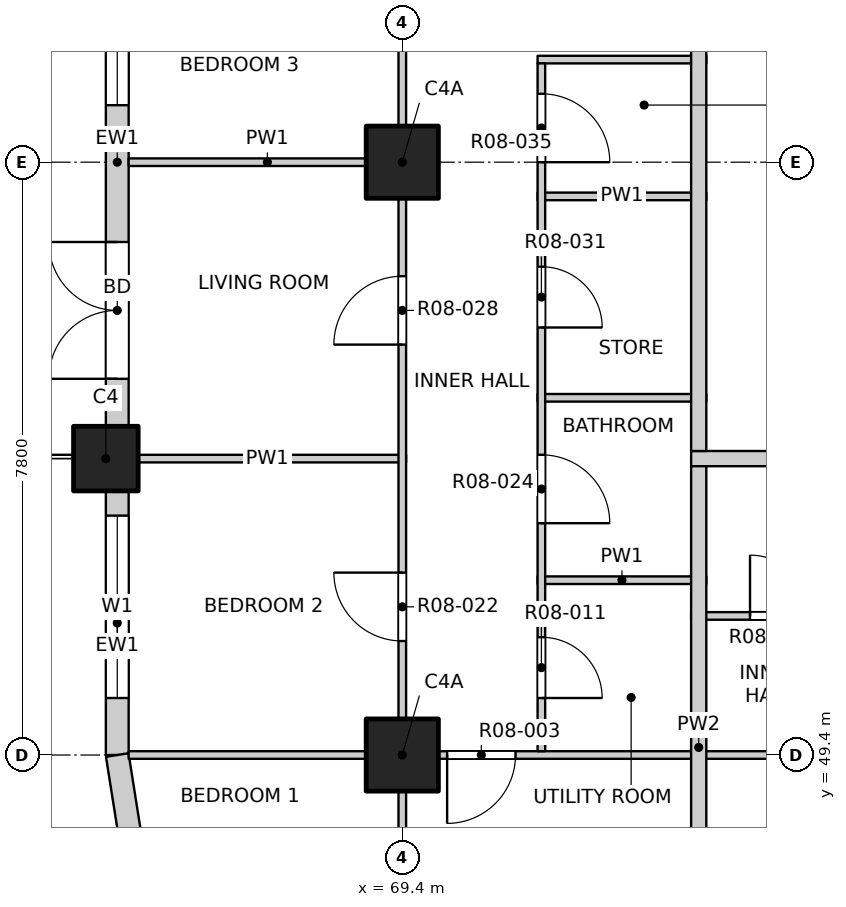
"""IFC4 building model, lengths in metres.
Left out: names, types, materials, properties, quantities, classifications, styles, units other than length and angle.
Written with IfcOpenShell. Run it as: python <this file> out.ifc"""

import sys

from ifc_helpers import new_model, si_unit, direction, frame, frame_2d, origin, origin_2d, place, context, subcontext, project, spatial, rectangle, extrude, element, fill, save


model = new_model("IFC4")
c1 = context("Model", 3, precision=1e-05, world=origin(), true_north=direction((0.0, 1.0)))
c2 = subcontext(c1, "Body", "Model", "MODEL_VIEW")
j1 = project(units=[si_unit("LENGTHUNIT", "METRE"), si_unit("PLANEANGLEUNIT", "RADIAN")], contexts=[c1])
p1 = place(None, origin())
s1 = spatial("IfcSite", under=j1, at=p1, CompositionType="ELEMENT")
p2 = place(p1, origin())
s2 = spatial("IfcBuilding", under=s1, at=p2, CompositionType="ELEMENT")
p3 = place(p2, frame((0.0, 0.0, 99.9)))
s3 = spatial("IfcBuildingStorey", under=s2, at=p3, CompositionType="ELEMENT", Elevation=99.9)
p4 = place(p3, frame((65.5, 53.3, -0.3), z_axis=(0.0, 0.0, 1.0), x_axis=(1.0, 0.0, 0.0)))
e1 = element("IfcColumn", 1, at=p4, inside=s3, PredefinedType="COLUMN", context=c2, shape_type="SweptSolid", body=[
    extrude(rectangle(XDim=0.85, YDim=0.85, at=origin_2d()), origin(), (0.0, 0.0, 1.0), 3.45),
])
for number, where, z_axis, x_axis in (
    (2, (69.4, 49.4, -0.3), (0.0, 0.0, 1.0), (1.0, 0.0, 0.0)),
    (3, (69.4, 57.2, -0.3), (0.0, 0.0, 1.0), (1.0, 0.0, 0.0)),
):
    element("IfcColumn", number, at=place(p3, frame(where, z_axis=z_axis, x_axis=x_axis)), inside=s3, PredefinedType="COLUMN", context=c2, shape_type="SweptSolid", body=[
        extrude(rectangle(XDim=0.95, YDim=0.95, at=origin_2d()), origin(), (0.0, 0.0, 1.0), 3.45),
    ])
p5 = place(p3, frame((65.65, 49.4, 0.0), z_axis=(0.0, 0.0, 1.0), x_axis=(0.0, 1.0, 0.0)))
e4 = element("IfcWall", 4, at=p5, inside=s3, PredefinedType="SOLIDWALL", context=c2, shape_type="SweptSolid", body=[
    extrude(rectangle(XDim=3.475, YDim=0.3, at=frame_2d((1.738, 0.0))), origin(), (0.0, 0.0, 1.0), 2.7),
])
p6 = place(p5, frame((0.75, 0.0, 0.9)))
e5 = element("IfcOpeningElement", 5, at=p6, cuts=e4, PredefinedType="OPENING", context=c2, shape_type="SweptSolid", body=[
    extrude(rectangle(XDim=2.4, YDim=1.8, at=frame_2d((1.2, 0.9))), frame((0.0, 0.16, 0.0), z_axis=(0.0, -1.0, 0.0), x_axis=(1.0, 0.0, 0.0)), (0.0, 0.0, 1.0), 0.32),
])
p7 = place(p3, frame((65.65, 53.725, 0.0), z_axis=(0.0, 0.0, 1.0), x_axis=(0.0, 1.0, 0.0)))
e6 = element("IfcWall", 6, at=p7, inside=s3, PredefinedType="SOLIDWALL", context=c2, shape_type="SweptSolid", body=[
    extrude(rectangle(XDim=6.95, YDim=0.3, at=frame_2d((3.475, 0.0))), origin(), (0.0, 0.0, 1.0), 2.7),
])
p8 = place(p7, frame((0.625, 0.0, 0.0)))
e7 = element("IfcOpeningElement", 7, at=p8, cuts=e6, PredefinedType="OPENING", context=c2, shape_type="SweptSolid", body=[
    extrude(rectangle(XDim=1.8, YDim=2.4, at=frame_2d((0.9, 1.2))), frame((0.0, 0.16, 0.0), z_axis=(0.0, -1.0, 0.0), x_axis=(1.0, 0.0, 0.0)), (0.0, 0.0, 1.0), 0.32),
])
p9 = place(p7, frame((4.225, 0.0, 0.9)))
e8 = element("IfcOpeningElement", 8, at=p9, cuts=e6, PredefinedType="OPENING", context=c2, shape_type="SweptSolid", body=[
    extrude(rectangle(XDim=2.4, YDim=1.8, at=frame_2d((1.2, 0.9))), frame((0.0, 0.16, 0.0), z_axis=(0.0, -1.0, 0.0), x_axis=(1.0, 0.0, 0.0)), (0.0, 0.0, 1.0), 0.32),
])
p10 = place(p3, frame((65.65, 49.4, 0.0), z_axis=(0.0, 0.0, 1.0), x_axis=(0.156496880861, -0.987678452879, 0.0)))
e9 = element("IfcWall", 9, at=p10, inside=s3, PredefinedType="SOLIDWALL", context=c2, shape_type="SweptSolid", body=[
    extrude(rectangle(XDim=1.173, YDim=0.3, at=frame_2d((0.586, 0.0))), origin(), (0.0, 0.0, 1.0), 2.7),
])
p11 = place(p3, frame((65.8, 49.4, 0.0), z_axis=(0.0, 0.0, 1.0), x_axis=(1.0, 0.0, 0.0)))
e10 = element("IfcWall", 10, at=p11, inside=s3, PredefinedType="PARTITIONING", context=c2, shape_type="SweptSolid", body=[
    extrude(rectangle(XDim=38.4, YDim=0.1, at=frame_2d((19.2, 0.0))), origin(), (0.0, 0.0, 1.0), 3.15),
])
p12 = place(p11, frame((4.19, 0.0, 0.0)))
e11 = element("IfcOpeningElement", 11, at=p12, cuts=e10, PredefinedType="OPENING", context=c2, shape_type="SweptSolid", body=[
    extrude(rectangle(XDim=0.9, YDim=2.1, at=frame_2d((0.45, 1.05))), frame((0.0, 0.06, 0.0), z_axis=(0.0, -1.0, 0.0), x_axis=(1.0, 0.0, 0.0)), (0.0, 0.0, 1.0), 0.12),
])
p13 = place(p11, frame((9.0, 0.0, 0.0)))
e12 = element("IfcOpeningElement", 12, at=p13, cuts=e10, PredefinedType="OPENING", context=c2, shape_type="SweptSolid", body=[
    extrude(rectangle(XDim=0.9, YDim=2.1, at=frame_2d((0.45, 1.05))), frame((0.0, 0.06, 0.0), z_axis=(0.0, -1.0, 0.0), x_axis=(1.0, 0.0, 0.0)), (0.0, 0.0, 1.0), 0.12),
])
p14 = place(p11, frame((12.9, 0.0, 0.0)))
e13 = element("IfcOpeningElement", 13, at=p14, cuts=e10, PredefinedType="OPENING", context=c2, shape_type="SweptSolid", body=[
    extrude(rectangle(XDim=0.9, YDim=2.1, at=frame_2d((0.45, 1.05))), frame((0.0, 0.06, 0.0), z_axis=(0.0, -1.0, 0.0), x_axis=(1.0, 0.0, 0.0)), (0.0, 0.0, 1.0), 0.12),
])
p15 = place(p11, frame((16.8, 0.0, 0.0)))
e14 = element("IfcOpeningElement", 14, at=p15, cuts=e10, PredefinedType="OPENING", context=c2, shape_type="SweptSolid", body=[
    extrude(rectangle(XDim=0.9, YDim=2.1, at=frame_2d((0.45, 1.05))), frame((0.0, 0.06, 0.0), z_axis=(0.0, -1.0, 0.0), x_axis=(1.0, 0.0, 0.0)), (0.0, 0.0, 1.0), 0.12),
])
p16 = place(p11, frame((20.7, 0.0, 0.0)))
e15 = element("IfcOpeningElement", 15, at=p16, cuts=e10, PredefinedType="OPENING", context=c2, shape_type="SweptSolid", body=[
    extrude(rectangle(XDim=0.9, YDim=2.1, at=frame_2d((0.45, 1.05))), frame((0.0, 0.06, 0.0), z_axis=(0.0, -1.0, 0.0), x_axis=(1.0, 0.0, 0.0)), (0.0, 0.0, 1.0), 0.12),
])
p17 = place(p11, frame((24.6, 0.0, 0.0)))
e16 = element("IfcOpeningElement", 16, at=p17, cuts=e10, PredefinedType="OPENING", context=c2, shape_type="SweptSolid", body=[
    extrude(rectangle(XDim=0.9, YDim=2.1, at=frame_2d((0.45, 1.05))), frame((0.0, 0.06, 0.0), z_axis=(0.0, -1.0, 0.0), x_axis=(1.0, 0.0, 0.0)), (0.0, 0.0, 1.0), 0.12),
])
p18 = place(p11, frame((28.5, 0.0, 0.0)))
e17 = element("IfcOpeningElement", 17, at=p18, cuts=e10, PredefinedType="OPENING", context=c2, shape_type="SweptSolid", body=[
    extrude(rectangle(XDim=0.9, YDim=2.1, at=frame_2d((0.45, 1.05))), frame((0.0, 0.06, 0.0), z_axis=(0.0, -1.0, 0.0), x_axis=(1.0, 0.0, 0.0)), (0.0, 0.0, 1.0), 0.12),
])
p19 = place(p11, frame((33.31, 0.0, 0.0)))
e18 = element("IfcOpeningElement", 18, at=p19, cuts=e10, PredefinedType="OPENING", context=c2, shape_type="SweptSolid", body=[
    extrude(rectangle(XDim=0.9, YDim=2.1, at=frame_2d((0.45, 1.05))), frame((0.0, 0.06, 0.0), z_axis=(0.0, -1.0, 0.0), x_axis=(1.0, 0.0, 0.0)), (0.0, 0.0, 1.0), 0.12),
])
p20 = place(p3, frame((73.2, 51.23, 0.0), z_axis=(0.0, 0.0, 1.0), x_axis=(1.0, 0.0, 0.0)))
e19 = element("IfcWall", 19, at=p20, inside=s3, PredefinedType="PARTITIONING", context=c2, shape_type="SweptSolid", body=[
    extrude(rectangle(XDim=4.75, YDim=0.1, at=frame_2d((2.375, 0.0))), origin(), (0.0, 0.0, 1.0), 3.15),
])
p21 = place(p20, frame((0.775, 0.0, 0.0)))
e20 = element("IfcOpeningElement", 20, at=p21, cuts=e19, PredefinedType="OPENING", context=c2, shape_type="SweptSolid", body=[
    extrude(rectangle(XDim=0.8, YDim=2.1, at=frame_2d((0.4, 1.05))), frame((0.0, 0.06, 0.0), z_axis=(0.0, -1.0, 0.0), x_axis=(1.0, 0.0, 0.0)), (0.0, 0.0, 1.0), 0.12),
])
p22 = place(p20, frame((3.025, 0.0, 0.0)))
e21 = element("IfcOpeningElement", 21, at=p22, cuts=e19, PredefinedType="OPENING", context=c2, shape_type="SweptSolid", body=[
    extrude(rectangle(XDim=0.9, YDim=2.1, at=frame_2d((0.45, 1.05))), frame((0.0, 0.06, 0.0), z_axis=(0.0, -1.0, 0.0), x_axis=(1.0, 0.0, 0.0)), (0.0, 0.0, 1.0), 0.12),
])
p23 = place(p3, frame((71.18, 51.7, 0.0), z_axis=(0.0, 0.0, 1.0), x_axis=(1.0, 0.0, 0.0)))
e22 = element("IfcWall", 22, at=p23, inside=s3, PredefinedType="PARTITIONING", context=c2, shape_type="SweptSolid", body=[
    extrude(rectangle(XDim=2.22, YDim=0.1, at=frame_2d((1.11, 0.0))), origin(), (0.0, 0.0, 1.0), 3.15),
])
p24 = place(p3, frame((65.8, 53.3, 0.0), z_axis=(0.0, 0.0, 1.0), x_axis=(1.0, 0.0, 0.0)))
e23 = element("IfcWall", 23, at=p24, inside=s3, PredefinedType="PARTITIONING", context=c2, shape_type="SweptSolid", body=[
    extrude(rectangle(XDim=3.65, YDim=0.1, at=frame_2d((1.825, 0.0))), origin(), (0.0, 0.0, 1.0), 3.15),
])
p25 = place(p3, frame((73.2, 53.3, 0.0), z_axis=(0.0, 0.0, 1.0), x_axis=(1.0, 0.0, 0.0)))
e24 = element("IfcWall", 24, at=p25, inside=s3, PredefinedType="PARTITIONING", context=c2, shape_type="SweptSolid", body=[
    extrude(rectangle(XDim=23.6, YDim=0.2, at=frame_2d((11.8, 0.0))), origin(), (0.0, 0.0, 1.0), 3.15),
])
p26 = place(p25, frame((5.975, 0.0, 0.0)))
e25 = element("IfcOpeningElement", 25, at=p26, cuts=e24, PredefinedType="OPENING", context=c2, shape_type="SweptSolid", body=[
    extrude(rectangle(XDim=1.0, YDim=2.1, at=frame_2d((0.5, 1.05))), frame((0.0, 0.11, 0.0), z_axis=(0.0, -1.0, 0.0), x_axis=(1.0, 0.0, 0.0)), (0.0, 0.0, 1.0), 0.22),
])
p27 = place(p25, frame((18.075, 0.0, 0.0)))
e26 = element("IfcOpeningElement", 26, at=p27, cuts=e24, PredefinedType="OPENING", context=c2, shape_type="SweptSolid", body=[
    extrude(rectangle(XDim=1.0, YDim=2.1, at=frame_2d((0.5, 1.05))), frame((0.0, 0.11, 0.0), z_axis=(0.0, -1.0, 0.0), x_axis=(1.0, 0.0, 0.0)), (0.0, 0.0, 1.0), 0.22),
])
for number, where, z_axis, x_axis in (
    (27, (71.18, 54.1, 0.0), (0.0, 0.0, 1.0), (1.0, 0.0, 0.0)),
    (28, (71.18, 56.75, 0.0), (0.0, 0.0, 1.0), (1.0, 0.0, 0.0)),
):
    element("IfcWall", number, at=place(p3, frame(where, z_axis=z_axis, x_axis=x_axis)), inside=s3, PredefinedType="PARTITIONING", context=c2, shape_type="SweptSolid", body=[
        extrude(rectangle(XDim=2.22, YDim=0.1, at=frame_2d((1.11, 0.0))), origin(), (0.0, 0.0, 1.0), 3.15),
    ])
p28 = place(p3, frame((65.8, 57.2, 0.0), z_axis=(0.0, 0.0, 1.0), x_axis=(1.0, 0.0, 0.0)))
e29 = element("IfcWall", 29, at=p28, inside=s3, PredefinedType="PARTITIONING", context=c2, shape_type="SweptSolid", body=[
    extrude(rectangle(XDim=3.65, YDim=0.1, at=frame_2d((1.825, 0.0))), origin(), (0.0, 0.0, 1.0), 3.15),
])
p29 = place(p3, frame((71.18, 58.55, 0.0), z_axis=(0.0, 0.0, 1.0), x_axis=(1.0, 0.0, 0.0)))
e30 = element("IfcWall", 30, at=p29, inside=s3, PredefinedType="PARTITIONING", context=c2, shape_type="SweptSolid", body=[
    extrude(rectangle(XDim=2.22, YDim=0.1, at=frame_2d((1.11, 0.0))), origin(), (0.0, 0.0, 1.0), 3.15),
])
p30 = place(p3, frame((69.4, 45.8, 0.0), z_axis=(0.0, 0.0, 1.0), x_axis=(0.0, 1.0, 0.0)))
e31 = element("IfcWall", 31, at=p30, inside=s3, PredefinedType="PARTITIONING", context=c2, shape_type="SweptSolid", body=[
    extrude(rectangle(XDim=38.4, YDim=0.1, at=frame_2d((19.2, 0.0))), origin(), (0.0, 0.0, 1.0), 3.15),
])
p31 = place(p30, frame((1.05, 0.0, 0.0)))
e32 = element("IfcOpeningElement", 32, at=p31, cuts=e31, PredefinedType="OPENING", context=c2, shape_type="SweptSolid", body=[
    extrude(rectangle(XDim=1.2, YDim=2.1, at=frame_2d((0.6, 1.05))), frame((0.0, 0.06, 0.0), z_axis=(0.0, -1.0, 0.0), x_axis=(1.0, 0.0, 0.0)), (0.0, 0.0, 1.0), 0.12),
])
p32 = place(p30, frame((5.1, 0.0, 0.0)))
e33 = element("IfcOpeningElement", 33, at=p32, cuts=e31, PredefinedType="OPENING", context=c2, shape_type="SweptSolid", body=[
    extrude(rectangle(XDim=0.9, YDim=2.1, at=frame_2d((0.45, 1.05))), frame((0.0, 0.06, 0.0), z_axis=(0.0, -1.0, 0.0), x_axis=(1.0, 0.0, 0.0)), (0.0, 0.0, 1.0), 0.12),
])
p33 = place(p30, frame((9.0, 0.0, 0.0)))
e34 = element("IfcOpeningElement", 34, at=p33, cuts=e31, PredefinedType="OPENING", context=c2, shape_type="SweptSolid", body=[
    extrude(rectangle(XDim=0.9, YDim=2.1, at=frame_2d((0.45, 1.05))), frame((0.0, 0.06, 0.0), z_axis=(0.0, -1.0, 0.0), x_axis=(1.0, 0.0, 0.0)), (0.0, 0.0, 1.0), 0.12),
])
p34 = place(p30, frame((12.9, 0.0, 0.0)))
e35 = element("IfcOpeningElement", 35, at=p34, cuts=e31, PredefinedType="OPENING", context=c2, shape_type="SweptSolid", body=[
    extrude(rectangle(XDim=0.9, YDim=2.1, at=frame_2d((0.45, 1.05))), frame((0.0, 0.06, 0.0), z_axis=(0.0, -1.0, 0.0), x_axis=(1.0, 0.0, 0.0)), (0.0, 0.0, 1.0), 0.12),
])
p35 = place(p30, frame((16.8, 0.0, 0.0)))
e36 = element("IfcOpeningElement", 36, at=p35, cuts=e31, PredefinedType="OPENING", context=c2, shape_type="SweptSolid", body=[
    extrude(rectangle(XDim=0.9, YDim=2.1, at=frame_2d((0.45, 1.05))), frame((0.0, 0.06, 0.0), z_axis=(0.0, -1.0, 0.0), x_axis=(1.0, 0.0, 0.0)), (0.0, 0.0, 1.0), 0.12),
])
p36 = place(p30, frame((20.7, 0.0, 0.0)))
e37 = element("IfcOpeningElement", 37, at=p36, cuts=e31, PredefinedType="OPENING", context=c2, shape_type="SweptSolid", body=[
    extrude(rectangle(XDim=0.9, YDim=2.1, at=frame_2d((0.45, 1.05))), frame((0.0, 0.06, 0.0), z_axis=(0.0, -1.0, 0.0), x_axis=(1.0, 0.0, 0.0)), (0.0, 0.0, 1.0), 0.12),
])
p37 = place(p30, frame((24.6, 0.0, 0.0)))
e38 = element("IfcOpeningElement", 38, at=p37, cuts=e31, PredefinedType="OPENING", context=c2, shape_type="SweptSolid", body=[
    extrude(rectangle(XDim=0.9, YDim=2.1, at=frame_2d((0.45, 1.05))), frame((0.0, 0.06, 0.0), z_axis=(0.0, -1.0, 0.0), x_axis=(1.0, 0.0, 0.0)), (0.0, 0.0, 1.0), 0.12),
])
p38 = place(p30, frame((28.5, 0.0, 0.0)))
e39 = element("IfcOpeningElement", 39, at=p38, cuts=e31, PredefinedType="OPENING", context=c2, shape_type="SweptSolid", body=[
    extrude(rectangle(XDim=0.9, YDim=2.1, at=frame_2d((0.45, 1.05))), frame((0.0, 0.06, 0.0), z_axis=(0.0, -1.0, 0.0), x_axis=(1.0, 0.0, 0.0)), (0.0, 0.0, 1.0), 0.12),
])
p39 = place(p30, frame((32.4, 0.0, 0.0)))
e40 = element("IfcOpeningElement", 40, at=p39, cuts=e31, PredefinedType="OPENING", context=c2, shape_type="SweptSolid", body=[
    extrude(rectangle(XDim=0.9, YDim=2.1, at=frame_2d((0.45, 1.05))), frame((0.0, 0.06, 0.0), z_axis=(0.0, -1.0, 0.0), x_axis=(1.0, 0.0, 0.0)), (0.0, 0.0, 1.0), 0.12),
])
p40 = place(p30, frame((36.15, 0.0, 0.0)))
e41 = element("IfcOpeningElement", 41, at=p40, cuts=e31, PredefinedType="OPENING", context=c2, shape_type="SweptSolid", body=[
    extrude(rectangle(XDim=1.2, YDim=2.1, at=frame_2d((0.6, 1.05))), frame((0.0, 0.06, 0.0), z_axis=(0.0, -1.0, 0.0), x_axis=(1.0, 0.0, 0.0)), (0.0, 0.0, 1.0), 0.12),
])
p41 = place(p3, frame((71.23, 49.45, 0.0), z_axis=(0.0, 0.0, 1.0), x_axis=(0.0, 1.0, 0.0)))
e42 = element("IfcWall", 42, at=p41, inside=s3, PredefinedType="PARTITIONING", context=c2, shape_type="SweptSolid", body=[
    extrude(rectangle(XDim=9.05, YDim=0.1, at=frame_2d((4.525, 0.0))), origin(), (0.0, 0.0, 1.0), 3.15),
])
p42 = place(p41, frame((0.7, 0.0, 0.0)))
e43 = element("IfcOpeningElement", 43, at=p42, cuts=e42, PredefinedType="OPENING", context=c2, shape_type="SweptSolid", body=[
    extrude(rectangle(XDim=0.8, YDim=2.1, at=frame_2d((0.4, 1.05))), frame((0.0, 0.06, 0.0), z_axis=(0.0, -1.0, 0.0), x_axis=(1.0, 0.0, 0.0)), (0.0, 0.0, 1.0), 0.12),
])
p43 = place(p41, frame((3.0, 0.0, 0.0)))
e44 = element("IfcOpeningElement", 44, at=p43, cuts=e42, PredefinedType="OPENING", context=c2, shape_type="SweptSolid", body=[
    extrude(rectangle(XDim=0.9, YDim=2.1, at=frame_2d((0.45, 1.05))), frame((0.0, 0.06, 0.0), z_axis=(0.0, -1.0, 0.0), x_axis=(1.0, 0.0, 0.0)), (0.0, 0.0, 1.0), 0.12),
])
p44 = place(p41, frame((5.575, 0.0, 0.0)))
e45 = element("IfcOpeningElement", 45, at=p44, cuts=e42, PredefinedType="OPENING", context=c2, shape_type="SweptSolid", body=[
    extrude(rectangle(XDim=0.8, YDim=2.1, at=frame_2d((0.4, 1.05))), frame((0.0, 0.06, 0.0), z_axis=(0.0, -1.0, 0.0), x_axis=(1.0, 0.0, 0.0)), (0.0, 0.0, 1.0), 0.12),
])
p45 = place(p41, frame((7.75, 0.0, 0.0)))
e46 = element("IfcOpeningElement", 46, at=p45, cuts=e42, PredefinedType="OPENING", context=c2, shape_type="SweptSolid", body=[
    extrude(rectangle(XDim=0.9, YDim=2.1, at=frame_2d((0.45, 1.05))), frame((0.0, 0.06, 0.0), z_axis=(0.0, -1.0, 0.0), x_axis=(1.0, 0.0, 0.0)), (0.0, 0.0, 1.0), 0.12),
])
p46 = place(p3, frame((73.3, 45.8, 0.0), z_axis=(0.0, 0.0, 1.0), x_axis=(0.0, 1.0, 0.0)))
e47 = element("IfcWall", 47, at=p46, inside=s3, PredefinedType="PARTITIONING", context=c2, shape_type="SweptSolid", body=[
    extrude(rectangle(XDim=7.4, YDim=0.2, at=frame_2d((3.7, 0.0))), origin(), (0.0, 0.0, 1.0), 3.15),
])
p47 = place(p3, frame((73.3, 53.4, 0.0), z_axis=(0.0, 0.0, 1.0), x_axis=(0.0, 1.0, 0.0)))
e48 = element("IfcWall", 48, at=p47, inside=s3, PredefinedType="PARTITIONING", context=c2, shape_type="SweptSolid", body=[
    extrude(rectangle(XDim=30.8, YDim=0.2, at=frame_2d((15.4, 0.0))), origin(), (0.0, 0.0, 1.0), 3.15),
])
p48 = place(p47, frame((6.425, 0.0, 0.0)))
e49 = element("IfcOpeningElement", 49, at=p48, cuts=e48, PredefinedType="OPENING", context=c2, shape_type="SweptSolid", body=[
    extrude(rectangle(XDim=1.0, YDim=2.1, at=frame_2d((0.5, 1.05))), frame((0.0, 0.11, 0.0), z_axis=(0.0, -1.0, 0.0), x_axis=(1.0, 0.0, 0.0)), (0.0, 0.0, 1.0), 0.22),
])
p49 = place(p47, frame((18.525, 0.0, 0.0)))
e50 = element("IfcOpeningElement", 50, at=p49, cuts=e48, PredefinedType="OPENING", context=c2, shape_type="SweptSolid", body=[
    extrude(rectangle(XDim=1.0, YDim=2.1, at=frame_2d((0.5, 1.05))), frame((0.0, 0.11, 0.0), z_axis=(0.0, -1.0, 0.0), x_axis=(1.0, 0.0, 0.0)), (0.0, 0.0, 1.0), 0.22),
])
p50 = place(p6, origin())
e51 = element("IfcWindow", 51, at=p50, inside=s3, PartitioningType="DOUBLE_PANEL_VERTICAL", PredefinedType="WINDOW", context=c2, shape_type="SweptSolid", body=[
    extrude(rectangle(XDim=2.4, YDim=1.8, at=frame_2d((1.2, 0.9))), frame((0.0, 0.03, 0.0), z_axis=(0.0, -1.0, 0.0), x_axis=(1.0, 0.0, 0.0)), (0.0, 0.0, 1.0), 0.06),
])
fill(e5, e51)
p51 = place(p8, origin())
e52 = element("IfcDoor", 52, at=p51, inside=s3, OperationType="DOUBLE_DOOR_SINGLE_SWING", PredefinedType="DOOR", context=c2, shape_type="SweptSolid", body=[
    extrude(rectangle(XDim=1.8, YDim=2.4, at=frame_2d((0.9, 1.2))), frame((0.0, 0.025, 0.0), z_axis=(0.0, -1.0, 0.0), x_axis=(1.0, 0.0, 0.0)), (0.0, 0.0, 1.0), 0.05),
])
fill(e7, e52)
p52 = place(p9, origin())
e53 = element("IfcWindow", 53, at=p52, inside=s3, PartitioningType="DOUBLE_PANEL_VERTICAL", PredefinedType="WINDOW", context=c2, shape_type="SweptSolid", body=[
    extrude(rectangle(XDim=2.4, YDim=1.8, at=frame_2d((1.2, 0.9))), frame((0.0, 0.03, 0.0), z_axis=(0.0, -1.0, 0.0), x_axis=(1.0, 0.0, 0.0)), (0.0, 0.0, 1.0), 0.06),
])
fill(e8, e53)
p53 = place(p12, origin())
e54 = element("IfcDoor", 54, at=p53, inside=s3, OperationType="SINGLE_SWING_RIGHT", PredefinedType="DOOR", context=c2, shape_type="SweptSolid", body=[
    extrude(rectangle(XDim=0.9, YDim=2.1, at=frame_2d((0.45, 1.05))), frame((0.0, 0.025, 0.0), z_axis=(0.0, -1.0, 0.0), x_axis=(1.0, 0.0, 0.0)), (0.0, 0.0, 1.0), 0.05),
])
fill(e11, e54)
p54 = place(p42, origin())
e55 = element("IfcDoor", 55, at=p54, inside=s3, OperationType="SINGLE_SWING_RIGHT", PredefinedType="DOOR", context=c2, shape_type="SweptSolid", body=[
    extrude(rectangle(XDim=0.8, YDim=2.1, at=frame_2d((0.4, 1.05))), frame((0.0, 0.025, 0.0), z_axis=(0.0, -1.0, 0.0), x_axis=(1.0, 0.0, 0.0)), (0.0, 0.0, 1.0), 0.05),
])
fill(e43, e55)
p55 = place(p21, origin())
e56 = element("IfcDoor", 56, at=p55, inside=s3, OperationType="SINGLE_SWING_LEFT", PredefinedType="DOOR", context=c2, shape_type="SweptSolid", body=[
    extrude(rectangle(XDim=0.8, YDim=2.1, at=frame_2d((0.4, 1.05))), frame((0.0, 0.025, 0.0), z_axis=(0.0, -1.0, 0.0), x_axis=(1.0, 0.0, 0.0)), (0.0, 0.0, 1.0), 0.05),
])
fill(e20, e56)
p56 = place(p32, origin())
e57 = element("IfcDoor", 57, at=p56, inside=s3, OperationType="SINGLE_SWING_RIGHT", PredefinedType="DOOR", context=c2, shape_type="SweptSolid", body=[
    extrude(rectangle(XDim=0.9, YDim=2.1, at=frame_2d((0.45, 1.05))), frame((0.0, 0.025, 0.0), z_axis=(0.0, -1.0, 0.0), x_axis=(1.0, 0.0, 0.0)), (0.0, 0.0, 1.0), 0.05),
])
fill(e33, e57)
p57 = place(p43, origin())
e58 = element("IfcDoor", 58, at=p57, inside=s3, OperationType="SINGLE_SWING_RIGHT", PredefinedType="DOOR", context=c2, shape_type="SweptSolid", body=[
    extrude(rectangle(XDim=0.9, YDim=2.1, at=frame_2d((0.45, 1.05))), frame((0.0, 0.025, 0.0), z_axis=(0.0, -1.0, 0.0), x_axis=(1.0, 0.0, 0.0)), (0.0, 0.0, 1.0), 0.05),
])
fill(e44, e58)
p58 = place(p33, origin())
e59 = element("IfcDoor", 59, at=p58, inside=s3, OperationType="SINGLE_SWING_LEFT", PredefinedType="DOOR", context=c2, shape_type="SweptSolid", body=[
    extrude(rectangle(XDim=0.9, YDim=2.1, at=frame_2d((0.45, 1.05))), frame((0.0, 0.025, 0.0), z_axis=(0.0, -1.0, 0.0), x_axis=(1.0, 0.0, 0.0)), (0.0, 0.0, 1.0), 0.05),
])
fill(e34, e59)
p59 = place(p44, origin())
e60 = element("IfcDoor", 60, at=p59, inside=s3, OperationType="SINGLE_SWING_RIGHT", PredefinedType="DOOR", context=c2, shape_type="SweptSolid", body=[
    extrude(rectangle(XDim=0.8, YDim=2.1, at=frame_2d((0.4, 1.05))), frame((0.0, 0.025, 0.0), z_axis=(0.0, -1.0, 0.0), x_axis=(1.0, 0.0, 0.0)), (0.0, 0.0, 1.0), 0.05),
])
fill(e45, e60)
p60 = place(p45, origin())
e61 = element("IfcDoor", 61, at=p60, inside=s3, OperationType="SINGLE_SWING_RIGHT", PredefinedType="DOOR", context=c2, shape_type="SweptSolid", body=[
    extrude(rectangle(XDim=0.9, YDim=2.1, at=frame_2d((0.45, 1.05))), frame((0.0, 0.025, 0.0), z_axis=(0.0, -1.0, 0.0), x_axis=(1.0, 0.0, 0.0)), (0.0, 0.0, 1.0), 0.05),
])
fill(e46, e61)
save(model, sys.argv[1])
